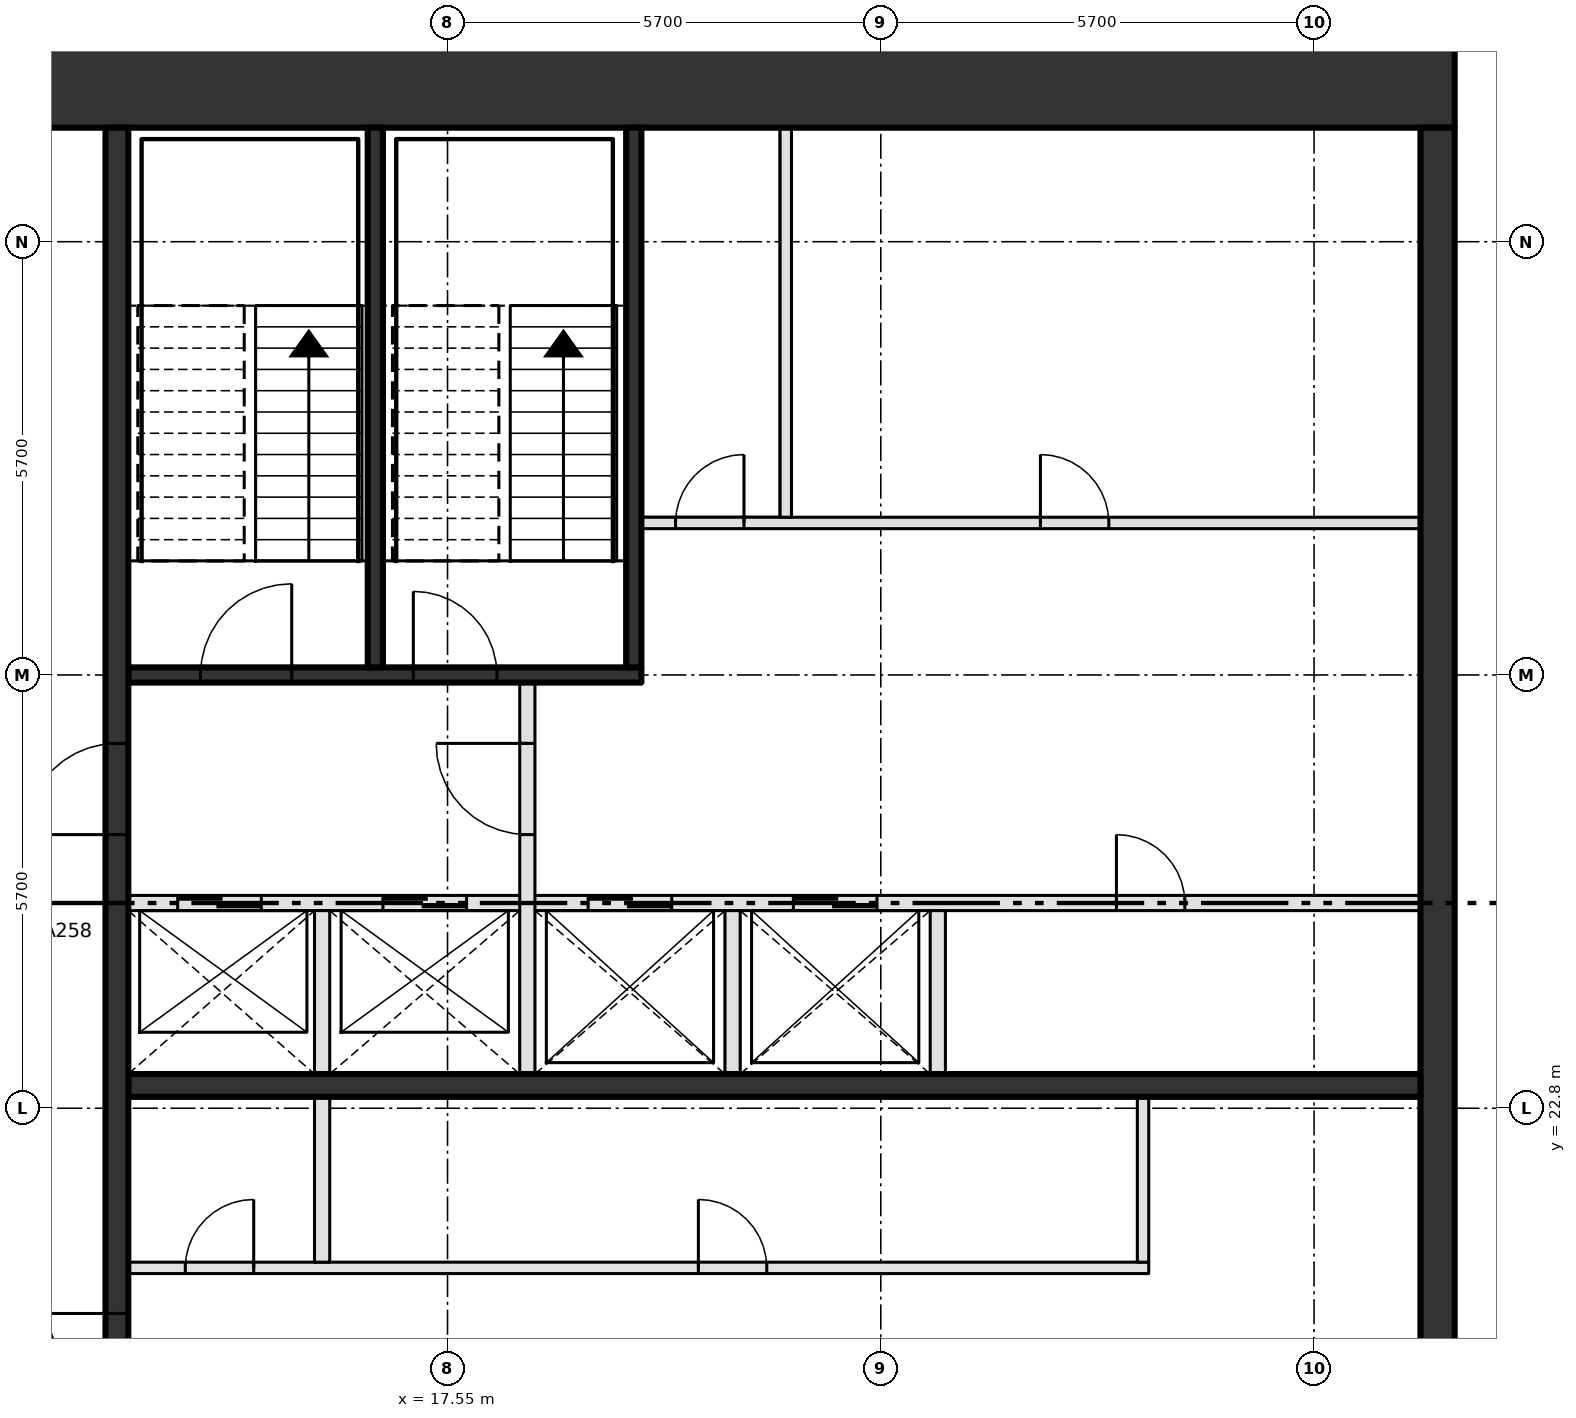
"""IFC4 building model, lengths in metres.
Left out: names, types, materials, properties, quantities, classifications, styles, units other than length and angle.
Written with IfcOpenShell. Run it as: python <this file> out.ifc"""

import sys

from ifc_helpers import new_model, si_unit, direction, frame, frame_2d, origin, place, context, subcontext, project, spatial, rectangle, extrude, element, fill, save


model = new_model("IFC4")
c1 = context("Model", 3, precision=1e-05, world=origin(), true_north=direction((0.0, 1.0)))
c2 = subcontext(c1, "Body", "Model", "MODEL_VIEW")
j1 = project(units=[si_unit("LENGTHUNIT", "METRE"), si_unit("PLANEANGLEUNIT", "RADIAN")], contexts=[c1])
p1 = place(None, origin())
s1 = spatial("IfcSite", under=j1, at=p1, CompositionType="ELEMENT")
p2 = place(p1, origin())
s2 = spatial("IfcBuilding", under=s1, at=p2, CompositionType="ELEMENT")
p3 = place(p2, frame((0.0, 0.0, 419.4)))
s3 = spatial("IfcBuildingStorey", under=s2, at=p3, CompositionType="ELEMENT", Elevation=419.4)
p4 = place(p3, frame((8.0, 36.3, -0.45), z_axis=(0.0, 0.0, 1.0), x_axis=(1.0, 0.0, 0.0)))
e1 = element("IfcWall", 1, at=p4, inside=s3, PredefinedType="SHEAR", context=c2, shape_type="SweptSolid", body=[
    extrude(rectangle(XDim=22.8, YDim=1.2, at=frame_2d((11.4, 0.0))), origin(), (0.0, 0.0, 1.0), 4.95),
])
p5 = place(p4, frame((2.3, 0.0, 0.45)))
e2 = element("IfcOpeningElement", 2, at=p5, cuts=e1, PredefinedType="OPENING", context=c2, shape_type="SweptSolid", body=[
    extrude(rectangle(XDim=1.8, YDim=2.1, at=frame_2d((0.9, 1.05))), frame((0.0, 0.61, 0.0), z_axis=(0.0, -1.0, 0.0), x_axis=(1.0, 0.0, 0.0)), (0.0, 0.0, 1.0), 1.22),
])
p6 = place(p3, frame((30.575, 14.55, -0.45), z_axis=(0.0, 0.0, 1.0), x_axis=(0.0, 1.0, 0.0)))
e3 = element("IfcWall", 3, at=p6, inside=s3, PredefinedType="SHEAR", context=c2, shape_type="SweptSolid", body=[
    extrude(rectangle(XDim=21.15, YDim=0.45, at=frame_2d((10.575, 0.0))), origin(), (0.0, 0.0, 1.0), 4.95),
])
p7 = place(p3, frame((13.35, 20.7, 0.0), z_axis=(0.0, 0.0, 1.0), x_axis=(1.0, 0.0, 0.0)))
e4 = element("IfcWall", 4, at=p7, inside=s3, PredefinedType="PARTITIONING", context=c2, shape_type="SweptSolid", body=[
    extrude(rectangle(XDim=13.425, YDim=0.15, at=frame_2d((6.712, 0.0))), origin(), (0.0, 0.0, 1.0), 4.5),
])
p8 = place(p7, frame((0.75, 0.0, 0.0)))
e5 = element("IfcOpeningElement", 5, at=p8, cuts=e4, PredefinedType="OPENING", context=c2, shape_type="SweptSolid", body=[
    extrude(rectangle(XDim=0.9, YDim=2.1, at=frame_2d((0.45, 1.05))), frame((0.0, 0.085, 0.0), z_axis=(0.0, -1.0, 0.0), x_axis=(1.0, 0.0, 0.0)), (0.0, 0.0, 1.0), 0.17),
])
p9 = place(p7, frame((7.5, 0.0, 0.0)))
e6 = element("IfcOpeningElement", 6, at=p9, cuts=e4, PredefinedType="OPENING", context=c2, shape_type="SweptSolid", body=[
    extrude(rectangle(XDim=0.9, YDim=2.1, at=frame_2d((0.45, 1.05))), frame((0.0, 0.085, 0.0), z_axis=(0.0, -1.0, 0.0), x_axis=(1.0, 0.0, 0.0)), (0.0, 0.0, 1.0), 0.17),
])
p10 = place(p3, frame((13.35, 23.1, 0.0), z_axis=(0.0, 0.0, 1.0), x_axis=(1.0, 0.0, 0.0)))
e7 = element("IfcWall", 7, at=p10, inside=s3, PredefinedType="SHEAR", context=c2, shape_type="SweptSolid", body=[
    extrude(rectangle(XDim=17.0, YDim=0.3, at=frame_2d((8.5, 0.0))), origin(), (0.0, 0.0, 1.0), 4.5),
])
p11 = place(p3, frame((13.35, 25.5, 0.0), z_axis=(0.0, 0.0, 1.0), x_axis=(1.0, 0.0, 0.0)))
e8 = element("IfcWall", 8, at=p11, inside=s3, PredefinedType="SOLIDWALL", context=c2, shape_type="SweptSolid", body=[
    extrude(rectangle(XDim=17.0, YDim=0.2, at=frame_2d((8.5, 0.0))), origin(), (0.0, 0.0, 1.0), 4.5),
])
p12 = place(p11, frame((0.65, 0.0, 0.0)))
e9 = element("IfcOpeningElement", 9, at=p12, cuts=e8, PredefinedType="OPENING", context=c2, shape_type="SweptSolid", body=[
    extrude(rectangle(XDim=1.1, YDim=2.1, at=frame_2d((0.55, 1.05))), frame((0.0, 0.11, 0.0), z_axis=(0.0, -1.0, 0.0), x_axis=(1.0, 0.0, 0.0)), (0.0, 0.0, 1.0), 0.22),
])
p13 = place(p11, frame((3.35, 0.0, 0.0)))
e10 = element("IfcOpeningElement", 10, at=p13, cuts=e8, PredefinedType="OPENING", context=c2, shape_type="SweptSolid", body=[
    extrude(rectangle(XDim=1.1, YDim=2.1, at=frame_2d((0.55, 1.05))), frame((0.0, 0.11, 0.0), z_axis=(0.0, -1.0, 0.0), x_axis=(1.0, 0.0, 0.0)), (0.0, 0.0, 1.0), 0.22),
])
p14 = place(p11, frame((6.05, 0.0, 0.0)))
e11 = element("IfcOpeningElement", 11, at=p14, cuts=e8, PredefinedType="OPENING", context=c2, shape_type="SweptSolid", body=[
    extrude(rectangle(XDim=1.1, YDim=2.1, at=frame_2d((0.55, 1.05))), frame((0.0, 0.11, 0.0), z_axis=(0.0, -1.0, 0.0), x_axis=(1.0, 0.0, 0.0)), (0.0, 0.0, 1.0), 0.22),
])
p15 = place(p11, frame((8.75, 0.0, 0.0)))
e12 = element("IfcOpeningElement", 12, at=p15, cuts=e8, PredefinedType="OPENING", context=c2, shape_type="SweptSolid", body=[
    extrude(rectangle(XDim=1.1, YDim=2.1, at=frame_2d((0.55, 1.05))), frame((0.0, 0.11, 0.0), z_axis=(0.0, -1.0, 0.0), x_axis=(1.0, 0.0, 0.0)), (0.0, 0.0, 1.0), 0.22),
])
p16 = place(p11, frame((13.0, 0.0, 0.0)))
e13 = element("IfcOpeningElement", 13, at=p16, cuts=e8, PredefinedType="OPENING", context=c2, shape_type="SweptSolid", body=[
    extrude(rectangle(XDim=0.9, YDim=2.1, at=frame_2d((0.45, 1.05))), frame((0.0, 0.11, 0.0), z_axis=(0.0, -1.0, 0.0), x_axis=(1.0, 0.0, 0.0)), (0.0, 0.0, 1.0), 0.22),
])
p17 = place(p3, frame((13.35, 28.5, 0.0), z_axis=(0.0, 0.0, 1.0), x_axis=(1.0, 0.0, 0.0)))
e14 = element("IfcWall", 14, at=p17, inside=s3, PredefinedType="SOLIDWALL", context=c2, shape_type="SweptSolid", body=[
    extrude(rectangle(XDim=6.75, YDim=0.2, at=frame_2d((3.375, 0.0))), origin(), (0.0, 0.0, 1.0), 4.5),
])
p18 = place(p17, frame((0.95, 0.0, 0.0)))
e15 = element("IfcOpeningElement", 15, at=p18, cuts=e14, PredefinedType="OPENING", context=c2, shape_type="SweptSolid", body=[
    extrude(rectangle(XDim=1.2, YDim=2.1, at=frame_2d((0.6, 1.05))), frame((0.0, 0.11, 0.0), z_axis=(0.0, -1.0, 0.0), x_axis=(1.0, 0.0, 0.0)), (0.0, 0.0, 1.0), 0.22),
])
p19 = place(p17, frame((3.75, 0.0, 0.0)))
e16 = element("IfcOpeningElement", 16, at=p19, cuts=e14, PredefinedType="OPENING", context=c2, shape_type="SweptSolid", body=[
    extrude(rectangle(XDim=1.1, YDim=2.1, at=frame_2d((0.55, 1.05))), frame((0.0, 0.11, 0.0), z_axis=(0.0, -1.0, 0.0), x_axis=(1.0, 0.0, 0.0)), (0.0, 0.0, 1.0), 0.22),
])
p20 = place(p3, frame((20.1, 30.5, 0.0), z_axis=(0.0, 0.0, 1.0), x_axis=(1.0, 0.0, 0.0)))
e17 = element("IfcWall", 17, at=p20, inside=s3, PredefinedType="PARTITIONING", context=c2, shape_type="SweptSolid", body=[
    extrude(rectangle(XDim=10.25, YDim=0.15, at=frame_2d((5.125, 0.0))), origin(), (0.0, 0.0, 1.0), 4.5),
])
p21 = place(p20, frame((0.45, 0.0, 0.0)))
e18 = element("IfcOpeningElement", 18, at=p21, cuts=e17, PredefinedType="OPENING", context=c2, shape_type="SweptSolid", body=[
    extrude(rectangle(XDim=0.9, YDim=2.1, at=frame_2d((0.45, 1.05))), frame((0.0, 0.085, 0.0), z_axis=(0.0, -1.0, 0.0), x_axis=(1.0, 0.0, 0.0)), (0.0, 0.0, 1.0), 0.17),
])
p22 = place(p20, frame((5.25, 0.0, 0.0)))
e19 = element("IfcOpeningElement", 19, at=p22, cuts=e17, PredefinedType="OPENING", context=c2, shape_type="SweptSolid", body=[
    extrude(rectangle(XDim=0.9, YDim=2.1, at=frame_2d((0.45, 1.05))), frame((0.0, 0.085, 0.0), z_axis=(0.0, -1.0, 0.0), x_axis=(1.0, 0.0, 0.0)), (0.0, 0.0, 1.0), 0.17),
])
p23 = place(p3, frame((13.2, 14.55, 0.0), z_axis=(0.0, 0.0, 1.0), x_axis=(0.0, 1.0, 0.0)))
e20 = element("IfcWall", 20, at=p23, inside=s3, PredefinedType="SHEAR", context=c2, shape_type="SweptSolid", body=[
    extrude(rectangle(XDim=21.15, YDim=0.3, at=frame_2d((10.575, 0.0))), origin(), (0.0, 0.0, 1.0), 4.5),
])
p24 = place(p23, frame((3.75, 0.0, 0.0)))
e21 = element("IfcOpeningElement", 21, at=p24, cuts=e20, PredefinedType="OPENING", context=c2, shape_type="SweptSolid", body=[
    extrude(rectangle(XDim=1.8, YDim=2.1, at=frame_2d((0.9, 1.05))), frame((0.0, 0.16, 0.0), z_axis=(0.0, -1.0, 0.0), x_axis=(1.0, 0.0, 0.0)), (0.0, 0.0, 1.0), 0.32),
])
p25 = place(p23, frame((11.85, 0.0, 0.0)))
e22 = element("IfcOpeningElement", 22, at=p25, cuts=e20, PredefinedType="OPENING", context=c2, shape_type="SweptSolid", body=[
    extrude(rectangle(XDim=1.2, YDim=2.1, at=frame_2d((0.6, 1.05))), frame((0.0, 0.16, 0.0), z_axis=(0.0, -1.0, 0.0), x_axis=(1.0, 0.0, 0.0)), (0.0, 0.0, 1.0), 0.32),
])
p26 = place(p3, frame((15.9, 20.775, 0.0), z_axis=(0.0, 0.0, 1.0), x_axis=(0.0, 1.0, 0.0)))
e23 = element("IfcWall", 23, at=p26, inside=s3, PredefinedType="SOLIDWALL", context=c2, shape_type="SweptSolid", body=[
    extrude(rectangle(XDim=4.625, YDim=0.2, at=frame_2d((2.312, 0.0))), origin(), (0.0, 0.0, 1.0), 4.5),
])
p27 = place(p3, frame((16.6, 28.6, 0.0), z_axis=(0.0, 0.0, 1.0), x_axis=(0.0, 1.0, 0.0)))
e24 = element("IfcWall", 24, at=p27, inside=s3, PredefinedType="SOLIDWALL", context=c2, shape_type="SweptSolid", body=[
    extrude(rectangle(XDim=7.1, YDim=0.2, at=frame_2d((3.55, 0.0))), origin(), (0.0, 0.0, 1.0), 4.5),
])
p28 = place(p3, frame((18.6, 23.25, 0.0), z_axis=(0.0, 0.0, 1.0), x_axis=(0.0, 1.0, 0.0)))
e25 = element("IfcWall", 25, at=p28, inside=s3, PredefinedType="SOLIDWALL", context=c2, shape_type="SweptSolid", body=[
    extrude(rectangle(XDim=5.15, YDim=0.2, at=frame_2d((2.575, 0.0))), origin(), (0.0, 0.0, 1.0), 4.5),
])
p29 = place(p28, frame((3.15, 0.0, 0.0)))
e26 = element("IfcOpeningElement", 26, at=p29, cuts=e25, PredefinedType="OPENING", context=c2, shape_type="SweptSolid", body=[
    extrude(rectangle(XDim=1.2, YDim=2.1, at=frame_2d((0.6, 1.05))), frame((0.0, 0.11, 0.0), z_axis=(0.0, -1.0, 0.0), x_axis=(1.0, 0.0, 0.0)), (0.0, 0.0, 1.0), 0.22),
])
p30 = place(p3, frame((20.0, 28.6, 0.0), z_axis=(0.0, 0.0, 1.0), x_axis=(0.0, 1.0, 0.0)))
e27 = element("IfcWall", 27, at=p30, inside=s3, PredefinedType="SOLIDWALL", context=c2, shape_type="SweptSolid", body=[
    extrude(rectangle(XDim=7.1, YDim=0.2, at=frame_2d((3.55, 0.0))), origin(), (0.0, 0.0, 1.0), 4.5),
])
p31 = place(p3, frame((21.3, 23.25, 0.0), z_axis=(0.0, 0.0, 1.0), x_axis=(0.0, 1.0, 0.0)))
e28 = element("IfcWall", 28, at=p31, inside=s3, PredefinedType="SOLIDWALL", context=c2, shape_type="SweptSolid", body=[
    extrude(rectangle(XDim=2.15, YDim=0.2, at=frame_2d((1.075, 0.0))), origin(), (0.0, 0.0, 1.0), 4.5),
])
p32 = place(p3, frame((22.0, 30.575, 0.0), z_axis=(0.0, 0.0, 1.0), x_axis=(0.0, 1.0, 0.0)))
e29 = element("IfcWall", 29, at=p32, inside=s3, PredefinedType="PARTITIONING", context=c2, shape_type="SweptSolid", body=[
    extrude(rectangle(XDim=5.125, YDim=0.15, at=frame_2d((2.562, 0.0))), origin(), (0.0, 0.0, 1.0), 4.5),
])
p33 = place(p3, frame((24.0, 23.25, 0.0), z_axis=(0.0, 0.0, 1.0), x_axis=(0.0, 1.0, 0.0)))
e30 = element("IfcWall", 30, at=p33, inside=s3, PredefinedType="SOLIDWALL", context=c2, shape_type="SweptSolid", body=[
    extrude(rectangle(XDim=2.15, YDim=0.2, at=frame_2d((1.075, 0.0))), origin(), (0.0, 0.0, 1.0), 4.5),
])
p34 = place(p3, frame((26.7, 20.775, 0.0), z_axis=(0.0, 0.0, 1.0), x_axis=(0.0, 1.0, 0.0)))
e31 = element("IfcWall", 31, at=p34, inside=s3, PredefinedType="PARTITIONING", context=c2, shape_type="SweptSolid", body=[
    extrude(rectangle(XDim=2.175, YDim=0.15, at=frame_2d((1.087, 0.0))), origin(), (0.0, 0.0, 1.0), 4.5),
])
p35 = place(p12, origin())
e32 = element("IfcDoor", 32, at=p35, inside=s3, OperationType="SLIDING_TO_LEFT", PredefinedType="DOOR", context=c2, shape_type="SweptSolid", body=[
    extrude(rectangle(XDim=1.1, YDim=2.1, at=frame_2d((0.55, 1.05))), frame((0.0, 0.025, 0.0), z_axis=(0.0, -1.0, 0.0), x_axis=(1.0, 0.0, 0.0)), (0.0, 0.0, 1.0), 0.05),
])
fill(e9, e32)
p36 = place(p13, origin())
e33 = element("IfcDoor", 33, at=p36, inside=s3, OperationType="SLIDING_TO_LEFT", PredefinedType="DOOR", context=c2, shape_type="SweptSolid", body=[
    extrude(rectangle(XDim=1.1, YDim=2.1, at=frame_2d((0.55, 1.05))), frame((0.0, 0.025, 0.0), z_axis=(0.0, -1.0, 0.0), x_axis=(1.0, 0.0, 0.0)), (0.0, 0.0, 1.0), 0.05),
])
fill(e10, e33)
p37 = place(p14, origin())
e34 = element("IfcDoor", 34, at=p37, inside=s3, OperationType="SLIDING_TO_LEFT", PredefinedType="DOOR", context=c2, shape_type="SweptSolid", body=[
    extrude(rectangle(XDim=1.1, YDim=2.1, at=frame_2d((0.55, 1.05))), frame((0.0, 0.025, 0.0), z_axis=(0.0, -1.0, 0.0), x_axis=(1.0, 0.0, 0.0)), (0.0, 0.0, 1.0), 0.05),
])
fill(e11, e34)
p38 = place(p15, origin())
e35 = element("IfcDoor", 35, at=p38, inside=s3, OperationType="SLIDING_TO_LEFT", PredefinedType="DOOR", context=c2, shape_type="SweptSolid", body=[
    extrude(rectangle(XDim=1.1, YDim=2.1, at=frame_2d((0.55, 1.05))), frame((0.0, 0.025, 0.0), z_axis=(0.0, -1.0, 0.0), x_axis=(1.0, 0.0, 0.0)), (0.0, 0.0, 1.0), 0.05),
])
fill(e12, e35)
p39 = place(p8, origin())
e36 = element("IfcDoor", 36, at=p39, inside=s3, OperationType="SINGLE_SWING_RIGHT", PredefinedType="DOOR", context=c2, shape_type="SweptSolid", body=[
    extrude(rectangle(XDim=0.9, YDim=2.1, at=frame_2d((0.45, 1.05))), frame((0.0, 0.025, 0.0), z_axis=(0.0, -1.0, 0.0), x_axis=(1.0, 0.0, 0.0)), (0.0, 0.0, 1.0), 0.05),
])
fill(e5, e36)
p40 = place(p9, origin())
e37 = element("IfcDoor", 37, at=p40, inside=s3, OperationType="SINGLE_SWING_LEFT", PredefinedType="DOOR", context=c2, shape_type="SweptSolid", body=[
    extrude(rectangle(XDim=0.9, YDim=2.1, at=frame_2d((0.45, 1.05))), frame((0.0, 0.025, 0.0), z_axis=(0.0, -1.0, 0.0), x_axis=(1.0, 0.0, 0.0)), (0.0, 0.0, 1.0), 0.05),
])
fill(e6, e37)
p41 = place(p16, origin())
e38 = element("IfcDoor", 38, at=p41, inside=s3, OperationType="SINGLE_SWING_LEFT", PredefinedType="DOOR", context=c2, shape_type="SweptSolid", body=[
    extrude(rectangle(XDim=0.9, YDim=2.1, at=frame_2d((0.45, 1.05))), frame((0.0, 0.025, 0.0), z_axis=(0.0, -1.0, 0.0), x_axis=(1.0, 0.0, 0.0)), (0.0, 0.0, 1.0), 0.05),
])
fill(e13, e38)
p42 = place(p21, origin())
e39 = element("IfcDoor", 39, at=p42, inside=s3, OperationType="SINGLE_SWING_RIGHT", PredefinedType="DOOR", context=c2, shape_type="SweptSolid", body=[
    extrude(rectangle(XDim=0.9, YDim=2.1, at=frame_2d((0.45, 1.05))), frame((0.0, 0.025, 0.0), z_axis=(0.0, -1.0, 0.0), x_axis=(1.0, 0.0, 0.0)), (0.0, 0.0, 1.0), 0.05),
])
fill(e18, e39)
p43 = place(p22, origin())
e40 = element("IfcDoor", 40, at=p43, inside=s3, OperationType="SINGLE_SWING_LEFT", PredefinedType="DOOR", context=c2, shape_type="SweptSolid", body=[
    extrude(rectangle(XDim=0.9, YDim=2.1, at=frame_2d((0.45, 1.05))), frame((0.0, 0.025, 0.0), z_axis=(0.0, -1.0, 0.0), x_axis=(1.0, 0.0, 0.0)), (0.0, 0.0, 1.0), 0.05),
])
fill(e19, e40)
p44 = place(p18, origin())
e41 = element("IfcDoor", 41, at=p44, inside=s3, OperationType="SINGLE_SWING_RIGHT", PredefinedType="DOOR", context=c2, shape_type="SweptSolid", body=[
    extrude(rectangle(XDim=1.2, YDim=2.1, at=frame_2d((0.6, 1.05))), frame((0.0, 0.025, 0.0), z_axis=(0.0, -1.0, 0.0), x_axis=(1.0, 0.0, 0.0)), (0.0, 0.0, 1.0), 0.05),
])
fill(e15, e41)
p45 = place(p19, origin())
e42 = element("IfcDoor", 42, at=p45, inside=s3, OperationType="SINGLE_SWING_LEFT", PredefinedType="DOOR", context=c2, shape_type="SweptSolid", body=[
    extrude(rectangle(XDim=1.1, YDim=2.1, at=frame_2d((0.55, 1.05))), frame((0.0, 0.025, 0.0), z_axis=(0.0, -1.0, 0.0), x_axis=(1.0, 0.0, 0.0)), (0.0, 0.0, 1.0), 0.05),
])
fill(e16, e42)
p46 = place(p24, origin())
e43 = element("IfcDoor", 43, at=p46, inside=s3, OperationType="DOUBLE_DOOR_SINGLE_SWING", PredefinedType="DOOR", context=c2, shape_type="SweptSolid", body=[
    extrude(rectangle(XDim=1.8, YDim=2.1, at=frame_2d((0.9, 1.05))), frame((0.0, 0.025, 0.0), z_axis=(0.0, -1.0, 0.0), x_axis=(1.0, 0.0, 0.0)), (0.0, 0.0, 1.0), 0.05),
])
fill(e21, e43)
p47 = place(p25, origin())
e44 = element("IfcDoor", 44, at=p47, inside=s3, OperationType="SINGLE_SWING_LEFT", PredefinedType="DOOR", context=c2, shape_type="SweptSolid", body=[
    extrude(rectangle(XDim=1.2, YDim=2.1, at=frame_2d((0.6, 1.05))), frame((0.0, 0.025, 0.0), z_axis=(0.0, -1.0, 0.0), x_axis=(1.0, 0.0, 0.0)), (0.0, 0.0, 1.0), 0.05),
])
fill(e22, e44)
p48 = place(p29, origin())
e45 = element("IfcDoor", 45, at=p48, inside=s3, OperationType="SINGLE_SWING_RIGHT", PredefinedType="DOOR", context=c2, shape_type="SweptSolid", body=[
    extrude(rectangle(XDim=1.2, YDim=2.1, at=frame_2d((0.6, 1.05))), frame((0.0, 0.025, 0.0), z_axis=(0.0, -1.0, 0.0), x_axis=(1.0, 0.0, 0.0)), (0.0, 0.0, 1.0), 0.05),
])
fill(e26, e45)
save(model, sys.argv[1])
